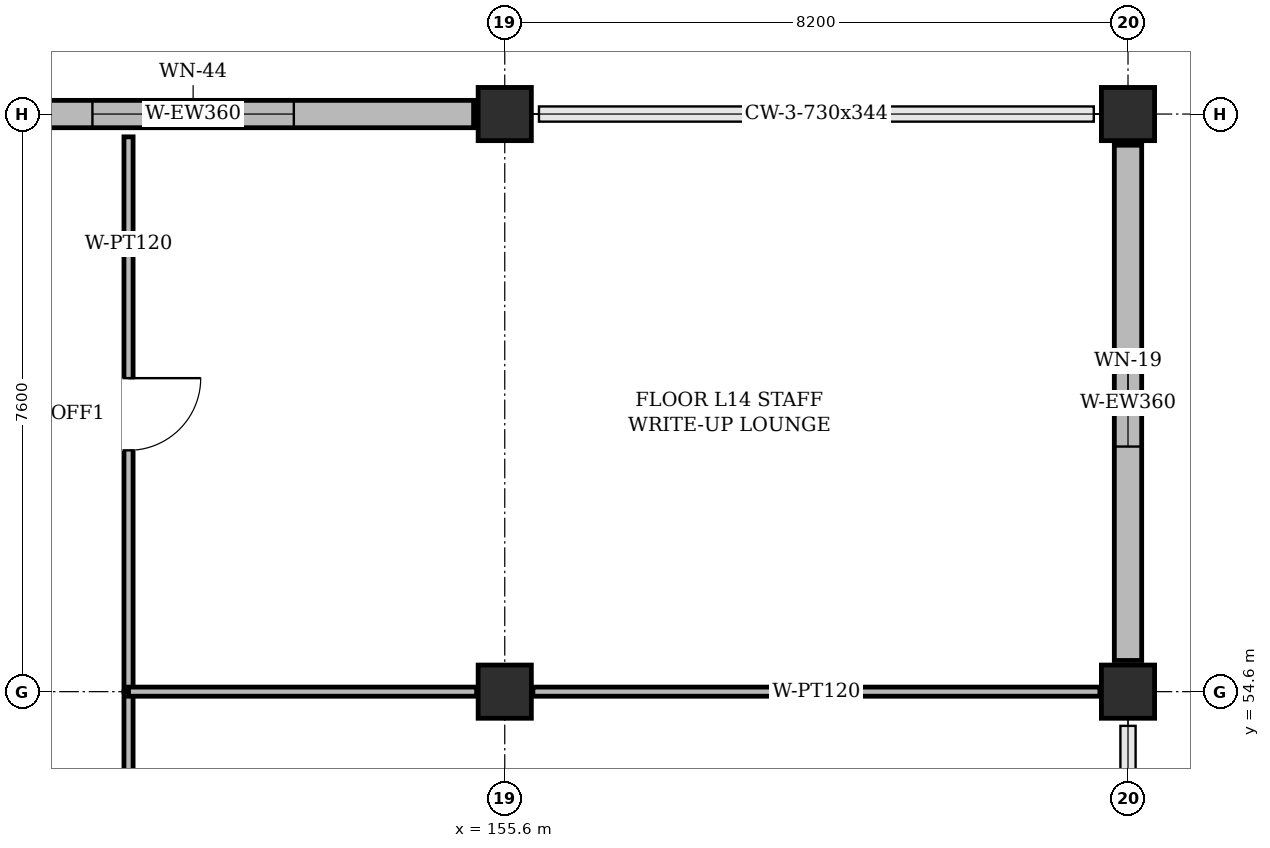
"""IFC4 building model, lengths in metres.
Left out: names, types, materials, properties, quantities, classifications, styles, units other than length and angle.
Written with IfcOpenShell. Run it as: python <this file> out.ifc"""

import sys

from ifc_helpers import new_model, si_unit, direction, frame, frame_2d, origin, origin_2d, place, context, subcontext, project, spatial, rectangle, extrude, element, fill, save


model = new_model("IFC4")
c1 = context("Model", 3, precision=1e-05, world=origin(), true_north=direction((0.0, 1.0)))
c2 = subcontext(c1, "Body", "Model", "MODEL_VIEW")
j1 = project(units=[si_unit("LENGTHUNIT", "METRE"), si_unit("PLANEANGLEUNIT", "RADIAN")], contexts=[c1])
p1 = place(None, origin())
s1 = spatial("IfcSite", under=j1, at=p1, CompositionType="ELEMENT")
p2 = place(p1, origin())
s2 = spatial("IfcBuilding", under=s1, at=p2, CompositionType="ELEMENT")
p3 = place(p2, frame((0.0, 0.0, 61.8)))
s3 = spatial("IfcBuildingStorey", under=s2, at=p3, CompositionType="ELEMENT", Elevation=61.8)
for number, where, z_axis, x_axis in (
    (1, (155.6, 54.6, 0.0), (0.0, 0.0, 1.0), (1.0, 0.0, 0.0)),
    (2, (155.6, 62.2, 0.0), (0.0, 0.0, 1.0), (1.0, 0.0, 0.0)),
    (3, (163.8, 54.6, 0.0), (0.0, 0.0, 1.0), (1.0, 0.0, 0.0)),
):
    element("IfcColumn", number, at=place(p3, frame(where, z_axis=z_axis, x_axis=x_axis)), inside=s3, PredefinedType="COLUMN", context=c2, shape_type="SweptSolid", body=[
        extrude(rectangle(XDim=0.7, YDim=0.7, at=origin_2d()), origin(), (0.0, 0.0, 1.0), 4.04),
    ])
p4 = place(p3, frame((163.8, 62.2, 0.0), z_axis=(0.0, 0.0, 1.0), x_axis=(1.0, 0.0, 0.0)))
e4 = element("IfcColumn", 4, at=p4, inside=s3, PredefinedType="COLUMN", context=c2, shape_type="SweptSolid", body=[
    extrude(rectangle(XDim=0.7, YDim=0.7, at=origin_2d()), origin(), (0.0, 0.0, 1.0), 4.145),
])
p5 = place(p3, frame((163.8, 55.01, 0.0), z_axis=(0.0, 0.0, 1.0), x_axis=(0.0, 1.0, 0.0)))
e5 = element("IfcWall", 5, at=p5, inside=s3, PredefinedType="SOLIDWALL", context=c2, shape_type="SweptSolid", body=[
    extrude(rectangle(XDim=6.78, YDim=0.36, at=frame_2d((3.39, 0.0))), origin(), (0.0, 0.0, 1.0), 3.425),
])
p6 = place(p5, frame((2.815, 0.0, 0.95)))
e6 = element("IfcOpeningElement", 6, at=p6, cuts=e5, PredefinedType="OPENING", context=c2, shape_type="SweptSolid", body=[
    extrude(rectangle(XDim=1.15, YDim=1.75, at=frame_2d((0.575, 0.875))), frame((0.0, 0.192, 0.0), z_axis=(0.0, -1.0, 0.0), x_axis=(1.0, 0.0, 0.0)), (0.0, 0.0, 1.0), 0.384),
])
p7 = place(p3, frame((155.19, 62.2, 0.0), z_axis=(0.0, 0.0, 1.0), x_axis=(-1.0, 0.0, 0.0)))
e7 = element("IfcWall", 7, at=p7, inside=s3, PredefinedType="SOLIDWALL", context=c2, shape_type="SweptSolid", body=[
    extrude(rectangle(XDim=7.38, YDim=0.36, at=frame_2d((3.69, 0.0))), origin(), (0.0, 0.0, 1.0), 3.425),
])
p8 = place(p7, frame((2.365, 0.0, 0.95)))
e8 = element("IfcOpeningElement", 8, at=p8, cuts=e7, PredefinedType="OPENING", context=c2, shape_type="SweptSolid", body=[
    extrude(rectangle(XDim=2.65, YDim=2.05, at=frame_2d((1.325, 1.025))), frame((0.0, 0.192, 0.0), z_axis=(0.0, -1.0, 0.0), x_axis=(1.0, 0.0, 0.0)), (0.0, 0.0, 1.0), 0.384),
])
p9 = place(p3, frame((150.65, 54.6, 0.0), z_axis=(0.0, 0.0, 1.0), x_axis=(0.0, -1.0, 0.0)))
e9 = element("IfcWall", 9, at=p9, inside=s3, PredefinedType="PARTITIONING", context=c2, shape_type="SweptSolid", body=[
    extrude(rectangle(XDim=18.35, YDim=0.12, at=frame_2d((9.175, 0.0))), origin(), (0.0, 0.0, 1.0), 4.005),
])
p10 = place(p9, frame((8.7, 0.0, 0.0)))
e10 = element("IfcOpeningElement", 10, at=p10, cuts=e9, PredefinedType="OPENING", context=c2, shape_type="SweptSolid", body=[
    extrude(rectangle(XDim=0.95, YDim=2.2, at=frame_2d((0.475, 1.1))), frame((0.0, 0.072, 0.0), z_axis=(0.0, -1.0, 0.0), x_axis=(1.0, 0.0, 0.0)), (0.0, 0.0, 1.0), 0.144),
])
p11 = place(p3, frame((150.65, 61.9, 0.0), z_axis=(0.0, 0.0, 1.0), x_axis=(0.0, -1.0, 0.0)))
e11 = element("IfcWall", 11, at=p11, inside=s3, PredefinedType="PARTITIONING", context=c2, shape_type="SweptSolid", body=[
    extrude(rectangle(XDim=7.3, YDim=0.12, at=frame_2d((3.65, 0.0))), origin(), (0.0, 0.0, 1.0), 4.005),
])
p12 = place(p11, frame((3.175, 0.0, 0.0)))
e12 = element("IfcOpeningElement", 12, at=p12, cuts=e11, PredefinedType="OPENING", context=c2, shape_type="SweptSolid", body=[
    extrude(rectangle(XDim=0.95, YDim=2.2, at=frame_2d((0.475, 1.1))), frame((0.0, 0.072, 0.0), z_axis=(0.0, -1.0, 0.0), x_axis=(1.0, 0.0, 0.0)), (0.0, 0.0, 1.0), 0.144),
])
p13 = place(p3, frame((150.65, 54.6, 0.0), z_axis=(0.0, 0.0, 1.0), x_axis=(1.0, 0.0, 0.0)))
e13 = element("IfcWall", 13, at=p13, inside=s3, PredefinedType="PARTITIONING", context=c2, shape_type="SweptSolid", body=[
    extrude(rectangle(XDim=4.58, YDim=0.12, at=frame_2d((2.29, 0.0))), origin(), (0.0, 0.0, 1.0), 3.375),
])
p14 = place(p3, frame((155.97, 54.6, 0.0), z_axis=(0.0, 0.0, 1.0), x_axis=(1.0, 0.0, 0.0)))
e14 = element("IfcWall", 14, at=p14, inside=s3, PredefinedType="PARTITIONING", context=c2, shape_type="SweptSolid", body=[
    extrude(rectangle(XDim=7.46, YDim=0.12, at=frame_2d((3.73, 0.0))), origin(), (0.0, 0.0, 1.0), 3.375),
])
p15 = place(p6, origin())
e15 = element("IfcWindow", 15, at=p15, inside=s3, PartitioningType="SINGLE_PANEL", PredefinedType="WINDOW", context=c2, shape_type="SweptSolid", body=[
    extrude(rectangle(XDim=1.15, YDim=1.75, at=frame_2d((0.575, 0.875))), frame((0.0, 0.03, 0.0), z_axis=(0.0, -1.0, 0.0), x_axis=(1.0, 0.0, 0.0)), (0.0, 0.0, 1.0), 0.06),
])
fill(e6, e15)
p16 = place(p8, origin())
e16 = element("IfcWindow", 16, at=p16, inside=s3, PartitioningType="DOUBLE_PANEL_VERTICAL", PredefinedType="WINDOW", context=c2, shape_type="SweptSolid", body=[
    extrude(rectangle(XDim=2.65, YDim=2.05, at=frame_2d((1.325, 1.025))), frame((0.0, 0.03, 0.0), z_axis=(0.0, -1.0, 0.0), x_axis=(1.0, 0.0, 0.0)), (0.0, 0.0, 1.0), 0.06),
])
fill(e8, e16)
p17 = place(p12, origin())
e17 = element("IfcDoor", 17, at=p17, inside=s3, OperationType="SINGLE_SWING_LEFT", PredefinedType="DOOR", context=c2, shape_type="SweptSolid", body=[
    extrude(rectangle(XDim=0.95, YDim=2.2, at=frame_2d((0.475, 1.1))), frame((0.0, 0.025, 0.0), z_axis=(0.0, -1.0, 0.0), x_axis=(1.0, 0.0, 0.0)), (0.0, 0.0, 1.0), 0.05),
])
fill(e12, e17)
save(model, sys.argv[1])
